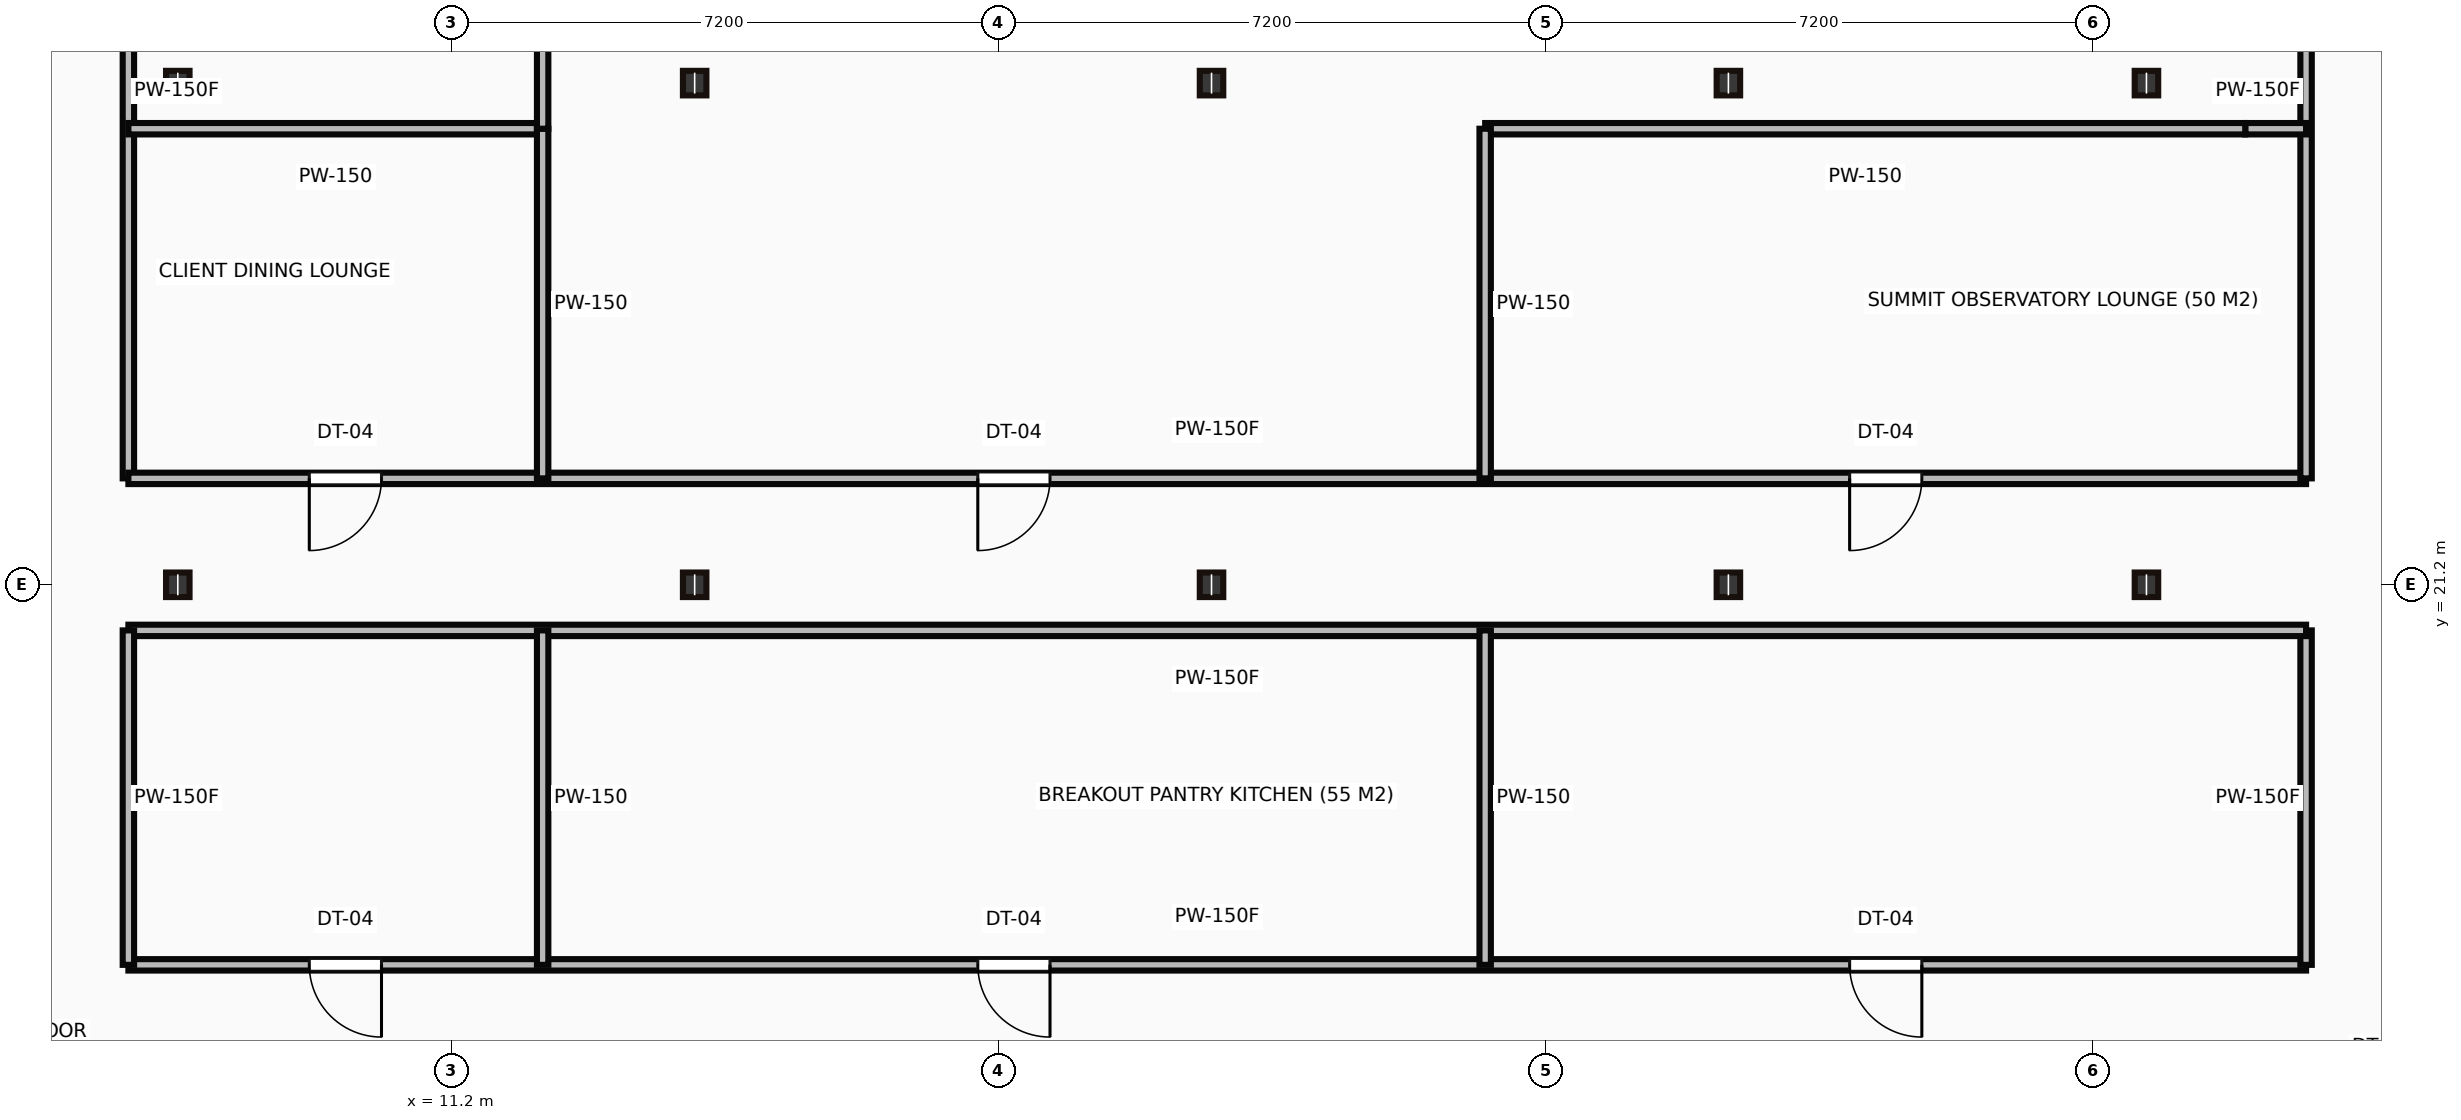
"""IFC4 building model, lengths in metres.
Left out: names, types, materials, properties, quantities, classifications, styles, units other than length and angle.
Written with IfcOpenShell. Run it as: python <this file> out.ifc"""

import sys

from ifc_helpers import new_model, si_unit, direction, frame, frame_2d, origin, origin_2d, place, context, subcontext, project, spatial, rectangle, i_section, extrude, source, transform, mapped, element, fill, save


model = new_model("IFC4")
c1 = context("Model", 3, precision=1e-05, world=origin(), true_north=direction((0.0, 1.0)))
c2 = subcontext(c1, "Body", "Model", "MODEL_VIEW")
j1 = project(units=[si_unit("LENGTHUNIT", "METRE"), si_unit("PLANEANGLEUNIT", "RADIAN")], contexts=[c1])
p1 = place(None, origin())
s1 = spatial("IfcSite", under=j1, at=p1, CompositionType="ELEMENT")
p2 = place(p1, origin())
s2 = spatial("IfcBuilding", under=s1, at=p2, CompositionType="ELEMENT")
p3 = place(p2, frame((0.0, 0.0, 288.0)))
s3 = spatial("IfcBuildingStorey", under=s2, at=p3, CompositionType="ELEMENT", Elevation=288.0)
m1 = source(origin(), c2, "Body", "SweptSolid", [
    extrude(i_section(OverallWidth=0.309, OverallDepth=0.323, WebThickness=0.014, FlangeThickness=0.023, at=origin_2d()), origin(), (0.0, 0.0, 1.0), 4.25),
])
for number, where, z_axis, x_axis in (
    (1, (7.6, 21.2, 0.0), (0.0, 0.0, 1.0), (1.0, 0.0, 0.0)),
    (2, (7.6, 27.8, 0.0), (0.0, 0.0, 1.0), (1.0, 0.0, 0.0)),
    (3, (14.4, 21.2, 0.0), (0.0, 0.0, 1.0), (1.0, 0.0, 0.0)),
    (4, (14.4, 27.8, 0.0), (0.0, 0.0, 1.0), (1.0, 0.0, 0.0)),
    (5, (21.2, 21.2, 0.0), (0.0, 0.0, 1.0), (1.0, 0.0, 0.0)),
    (6, (21.2, 27.8, 0.0), (0.0, 0.0, 1.0), (1.0, 0.0, 0.0)),
    (7, (28.0, 21.2, 0.0), (0.0, 0.0, 1.0), (1.0, 0.0, 0.0)),
    (8, (28.0, 27.8, 0.0), (0.0, 0.0, 1.0), (1.0, 0.0, 0.0)),
    (9, (33.5, 21.2, 0.0), (0.0, 0.0, 1.0), (1.0, 0.0, 0.0)),
    (10, (33.5, 27.8, 0.0), (0.0, 0.0, 1.0), (1.0, 0.0, 0.0)),
):
    element("IfcColumn", number, at=place(p3, frame(where, z_axis=z_axis, x_axis=x_axis)), inside=s3, PredefinedType="COLUMN", context=c2, shape_type="MappedRepresentation", body=[
        mapped(m1, transform((0.0, 0.0, 0.0))),
    ])
m2 = source(origin(), c2, "Body", "SweptSolid", [
    extrude(rectangle(XDim=10.2, YDim=0.15, at=frame_2d((5.1, 0.0))), origin(), (0.0, 0.0, 1.0), 3.85),
])
p4 = place(p3, frame((6.95, 32.8, 0.0), z_axis=(0.0, 0.0, 1.0), x_axis=(0.0, -1.0, 0.0)))
e11 = element("IfcWall", 11, at=p4, inside=s3, PredefinedType="PARTITIONING", context=c2, shape_type="MappedRepresentation", body=[
    mapped(m2, transform((0.0, 0.0, 0.0))),
])
p5 = place(p4, frame((2.455, 0.0, 0.0)))
e12 = element("IfcOpeningElement", 12, at=p5, cuts=e11, PredefinedType="OPENING", context=c2, shape_type="SweptSolid", body=[
    extrude(rectangle(XDim=0.95, YDim=2.15, at=frame_2d((0.475, 1.075))), frame((0.0, 0.085, 0.0), z_axis=(0.0, -1.0, 0.0), x_axis=(1.0, 0.0, 0.0)), (0.0, 0.0, 1.0), 0.17),
])
m3 = source(origin(), c2, "Body", "SweptSolid", [
    extrude(rectangle(XDim=28.65, YDim=0.15, at=frame_2d((14.325, 0.0))), origin(), (0.0, 0.0, 1.0), 3.85),
])
p6 = place(p3, frame((6.95, 22.6, 0.0), z_axis=(0.0, 0.0, 1.0), x_axis=(1.0, 0.0, 0.0)))
e13 = element("IfcWall", 13, at=p6, inside=s3, PredefinedType="PARTITIONING", context=c2, shape_type="MappedRepresentation", body=[
    mapped(m3, transform((0.0, 0.0, 0.0))),
])
p7 = place(p6, frame((2.38, 0.0, 0.0)))
e14 = element("IfcOpeningElement", 14, at=p7, cuts=e13, PredefinedType="OPENING", context=c2, shape_type="SweptSolid", body=[
    extrude(rectangle(XDim=0.95, YDim=2.15, at=frame_2d((0.475, 1.075))), frame((0.0, 0.085, 0.0), z_axis=(0.0, -1.0, 0.0), x_axis=(1.0, 0.0, 0.0)), (0.0, 0.0, 1.0), 0.17),
])
p8 = place(p6, frame((11.175, 0.0, 0.0)))
e15 = element("IfcOpeningElement", 15, at=p8, cuts=e13, PredefinedType="OPENING", context=c2, shape_type="SweptSolid", body=[
    extrude(rectangle(XDim=0.95, YDim=2.15, at=frame_2d((0.475, 1.075))), frame((0.0, 0.085, 0.0), z_axis=(0.0, -1.0, 0.0), x_axis=(1.0, 0.0, 0.0)), (0.0, 0.0, 1.0), 0.17),
])
p9 = place(p6, frame((22.645, 0.0, 0.0)))
e16 = element("IfcOpeningElement", 16, at=p9, cuts=e13, PredefinedType="OPENING", context=c2, shape_type="SweptSolid", body=[
    extrude(rectangle(XDim=0.95, YDim=2.15, at=frame_2d((0.475, 1.075))), frame((0.0, 0.085, 0.0), z_axis=(0.0, -1.0, 0.0), x_axis=(1.0, 0.0, 0.0)), (0.0, 0.0, 1.0), 0.17),
])
p10 = place(p3, frame((35.6, 22.6, 0.0), z_axis=(0.0, 0.0, 1.0), x_axis=(0.0, 1.0, 0.0)))
e17 = element("IfcWall", 17, at=p10, inside=s3, PredefinedType="PARTITIONING", context=c2, shape_type="MappedRepresentation", body=[
    mapped(m2, transform((0.0, 0.0, 0.0))),
])
p11 = place(p3, frame((6.95, 16.2, 0.0), z_axis=(0.0, 0.0, 1.0), x_axis=(1.0, 0.0, 0.0)))
e18 = element("IfcWall", 18, at=p11, inside=s3, PredefinedType="PARTITIONING", context=c2, shape_type="MappedRepresentation", body=[
    mapped(m3, transform((0.0, 0.0, 0.0))),
])
p12 = place(p11, frame((2.38, 0.0, 0.0)))
e19 = element("IfcOpeningElement", 19, at=p12, cuts=e18, PredefinedType="OPENING", context=c2, shape_type="SweptSolid", body=[
    extrude(rectangle(XDim=0.95, YDim=2.15, at=frame_2d((0.475, 1.075))), frame((0.0, 0.085, 0.0), z_axis=(0.0, -1.0, 0.0), x_axis=(1.0, 0.0, 0.0)), (0.0, 0.0, 1.0), 0.17),
])
p13 = place(p11, frame((11.175, 0.0, 0.0)))
e20 = element("IfcOpeningElement", 20, at=p13, cuts=e18, PredefinedType="OPENING", context=c2, shape_type="SweptSolid", body=[
    extrude(rectangle(XDim=0.95, YDim=2.15, at=frame_2d((0.475, 1.075))), frame((0.0, 0.085, 0.0), z_axis=(0.0, -1.0, 0.0), x_axis=(1.0, 0.0, 0.0)), (0.0, 0.0, 1.0), 0.17),
])
p14 = place(p11, frame((22.645, 0.0, 0.0)))
e21 = element("IfcOpeningElement", 21, at=p14, cuts=e18, PredefinedType="OPENING", context=c2, shape_type="SweptSolid", body=[
    extrude(rectangle(XDim=0.95, YDim=2.15, at=frame_2d((0.475, 1.075))), frame((0.0, 0.085, 0.0), z_axis=(0.0, -1.0, 0.0), x_axis=(1.0, 0.0, 0.0)), (0.0, 0.0, 1.0), 0.17),
])
m4 = source(origin(), c2, "Body", "SweptSolid", [
    extrude(rectangle(XDim=4.4, YDim=0.15, at=frame_2d((2.2, 0.0))), origin(), (0.0, 0.0, 1.0), 3.85),
])
p15 = place(p3, frame((35.6, 16.2, 0.0), z_axis=(0.0, 0.0, 1.0), x_axis=(0.0, 1.0, 0.0)))
e22 = element("IfcWall", 22, at=p15, inside=s3, PredefinedType="PARTITIONING", context=c2, shape_type="MappedRepresentation", body=[
    mapped(m4, transform((0.0, 0.0, 0.0))),
])
p16 = place(p3, frame((35.6, 20.6, 0.0), z_axis=(0.0, 0.0, 1.0), x_axis=(-1.0, 0.0, 0.0)))
e23 = element("IfcWall", 23, at=p16, inside=s3, PredefinedType="PARTITIONING", context=c2, shape_type="MappedRepresentation", body=[
    mapped(m3, transform((0.0, 0.0, 0.0))),
])
p17 = place(p3, frame((6.95, 20.6, 0.0), z_axis=(0.0, 0.0, 1.0), x_axis=(0.0, -1.0, 0.0)))
e24 = element("IfcWall", 24, at=p17, inside=s3, PredefinedType="PARTITIONING", context=c2, shape_type="MappedRepresentation", body=[
    mapped(m4, transform((0.0, 0.0, 0.0))),
])
m5 = source(origin(), c2, "Body", "SweptSolid", [
    extrude(rectangle(XDim=5.45, YDim=0.15, at=frame_2d((2.725, 0.0))), origin(), (0.0, 0.0, 1.0), 3.85),
])
p18 = place(p3, frame((12.4, 27.2, 0.0), z_axis=(0.0, 0.0, 1.0), x_axis=(-1.0, 0.0, 0.0)))
e25 = element("IfcWall", 25, at=p18, inside=s3, PredefinedType="PARTITIONING", context=c2, shape_type="MappedRepresentation", body=[
    mapped(m5, transform((0.0, 0.0, 0.0))),
])
p19 = place(p3, frame((12.4, 20.6, 0.0), z_axis=(0.0, 0.0, 1.0), x_axis=(0.0, -1.0, 0.0)))
e26 = element("IfcWall", 26, at=p19, inside=s3, PredefinedType="PARTITIONING", context=c2, shape_type="MappedRepresentation", body=[
    mapped(m4, transform((0.0, 0.0, 0.0))),
])
m6 = source(origin(), c2, "Body", "SweptSolid", [
    extrude(rectangle(XDim=4.6, YDim=0.15, at=frame_2d((2.3, 0.0))), origin(), (0.0, 0.0, 1.0), 3.85),
])
p20 = place(p3, frame((12.4, 27.2, 0.0), z_axis=(0.0, 0.0, 1.0), x_axis=(0.0, -1.0, 0.0)))
e27 = element("IfcWall", 27, at=p20, inside=s3, PredefinedType="PARTITIONING", context=c2, shape_type="MappedRepresentation", body=[
    mapped(m6, transform((0.0, 0.0, 0.0))),
])
m7 = source(origin(), c2, "Body", "SweptSolid", [
    extrude(rectangle(XDim=10.929, YDim=0.15, at=frame_2d((5.465, 0.0))), origin(), (0.0, 0.0, 1.0), 3.85),
])
p21 = place(p3, frame((12.4, 38.129, 0.0), z_axis=(0.0, 0.0, 1.0), x_axis=(0.0, -1.0, 0.0)))
e28 = element("IfcWall", 28, at=p21, inside=s3, PredefinedType="PARTITIONING", context=c2, shape_type="MappedRepresentation", body=[
    mapped(m7, transform((0.0, 0.0, 0.0))),
])
p22 = place(p3, frame((24.8, 20.6, 0.0), z_axis=(0.0, 0.0, 1.0), x_axis=(0.0, -1.0, 0.0)))
e29 = element("IfcWall", 29, at=p22, inside=s3, PredefinedType="PARTITIONING", context=c2, shape_type="MappedRepresentation", body=[
    mapped(m4, transform((0.0, 0.0, 0.0))),
])
m8 = source(origin(), c2, "Body", "SweptSolid", [
    extrude(rectangle(XDim=0.8, YDim=0.15, at=frame_2d((0.4, 0.0))), origin(), (0.0, 0.0, 1.0), 3.85),
])
p23 = place(p3, frame((35.6, 27.2, 0.0), z_axis=(0.0, 0.0, 1.0), x_axis=(-1.0, 0.0, 0.0)))
e30 = element("IfcWall", 30, at=p23, inside=s3, PredefinedType="PARTITIONING", context=c2, shape_type="MappedRepresentation", body=[
    mapped(m8, transform((0.0, 0.0, 0.0))),
])
m9 = source(origin(), c2, "Body", "SweptSolid", [
    extrude(rectangle(XDim=10.0, YDim=0.15, at=frame_2d((5.0, 0.0))), origin(), (0.0, 0.0, 1.0), 3.85),
])
p24 = place(p3, frame((34.8, 27.2, 0.0), z_axis=(0.0, 0.0, 1.0), x_axis=(-1.0, 0.0, 0.0)))
e31 = element("IfcWall", 31, at=p24, inside=s3, PredefinedType="PARTITIONING", context=c2, shape_type="MappedRepresentation", body=[
    mapped(m9, transform((0.0, 0.0, 0.0))),
])
p25 = place(p3, frame((24.8, 27.2, 0.0), z_axis=(0.0, 0.0, 1.0), x_axis=(0.0, -1.0, 0.0)))
e32 = element("IfcWall", 32, at=p25, inside=s3, PredefinedType="PARTITIONING", context=c2, shape_type="MappedRepresentation", body=[
    mapped(m6, transform((0.0, 0.0, 0.0))),
])
m10 = source(origin(), c2, "Body", "SweptSolid", [
    extrude(rectangle(XDim=0.95, YDim=2.15, at=frame_2d((0.475, 1.075))), frame((0.0, 0.025, 0.0), z_axis=(0.0, -1.0, 0.0), x_axis=(1.0, 0.0, 0.0)), (0.0, 0.0, 1.0), 0.05),
])
p26 = place(p12, origin())
e33 = element("IfcDoor", 33, at=p26, inside=s3, OperationType="SINGLE_SWING_RIGHT", PredefinedType="DOOR", context=c2, shape_type="MappedRepresentation", body=[
    mapped(m10, transform((0.0, 0.0, 0.0))),
])
fill(e19, e33)
p27 = place(p7, origin())
e34 = element("IfcDoor", 34, at=p27, inside=s3, OperationType="SINGLE_SWING_LEFT", PredefinedType="DOOR", context=c2, shape_type="MappedRepresentation", body=[
    mapped(m10, transform((0.0, 0.0, 0.0))),
])
fill(e14, e34)
p28 = place(p13, origin())
e35 = element("IfcDoor", 35, at=p28, inside=s3, OperationType="SINGLE_SWING_RIGHT", PredefinedType="DOOR", context=c2, shape_type="MappedRepresentation", body=[
    mapped(m10, transform((0.0, 0.0, 0.0))),
])
fill(e20, e35)
p29 = place(p8, origin())
e36 = element("IfcDoor", 36, at=p29, inside=s3, OperationType="SINGLE_SWING_LEFT", PredefinedType="DOOR", context=c2, shape_type="MappedRepresentation", body=[
    mapped(m10, transform((0.0, 0.0, 0.0))),
])
fill(e15, e36)
p30 = place(p14, origin())
e37 = element("IfcDoor", 37, at=p30, inside=s3, OperationType="SINGLE_SWING_RIGHT", PredefinedType="DOOR", context=c2, shape_type="MappedRepresentation", body=[
    mapped(m10, transform((0.0, 0.0, 0.0))),
])
fill(e21, e37)
p31 = place(p9, origin())
e38 = element("IfcDoor", 38, at=p31, inside=s3, OperationType="SINGLE_SWING_LEFT", PredefinedType="DOOR", context=c2, shape_type="MappedRepresentation", body=[
    mapped(m10, transform((0.0, 0.0, 0.0))),
])
fill(e16, e38)
save(model, sys.argv[1])
